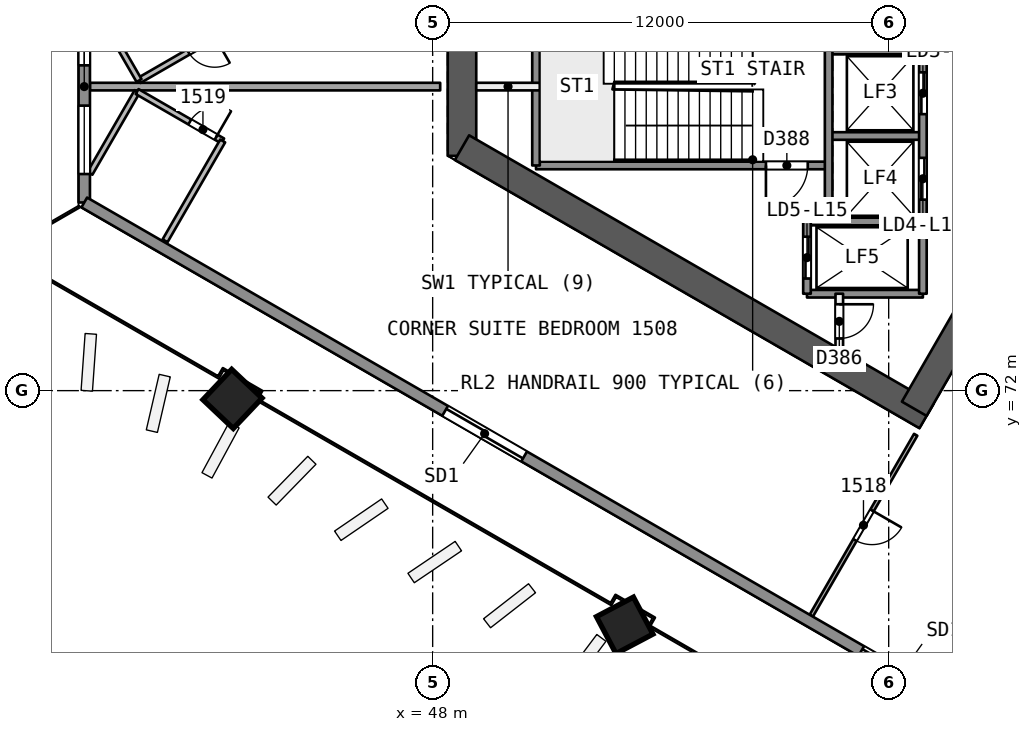
"""IFC4 building model, lengths in metres.
Left out: names, types, materials, properties, quantities, classifications, styles, units other than length and angle.
Written with IfcOpenShell. Run it as: python <this file> out.ifc"""

import sys

from ifc_helpers import new_model, si_unit, direction, frame, frame_2d, origin, origin_2d, place, context, subcontext, project, spatial, rectangle, extrude, element, fill, save


model = new_model("IFC4")
c1 = context("Model", 3, precision=1e-05, world=origin(), true_north=direction((0.0, 1.0)))
c2 = subcontext(c1, "Body", "Model", "MODEL_VIEW")
j1 = project(units=[si_unit("LENGTHUNIT", "METRE"), si_unit("PLANEANGLEUNIT", "RADIAN")], contexts=[c1])
p1 = place(None, origin())
s1 = spatial("IfcSite", under=j1, at=p1, CompositionType="ELEMENT")
p2 = place(p1, origin())
s2 = spatial("IfcBuilding", under=s1, at=p2, CompositionType="ELEMENT")
p3 = place(p2, frame((0.0, 0.0, 68.4)))
s3 = spatial("IfcBuildingStorey", under=s2, at=p3, CompositionType="ELEMENT", Elevation=68.4)
p4 = place(p3, frame((65.567, 80.0, 0.0), z_axis=(0.0, 0.0, 1.0), x_axis=(-0.499988615364, 0.866031976607, 0.0)))
e1 = element("IfcWall", 1, at=p4, inside=s3, PredefinedType="SHEAR", context=c2, shape_type="SweptSolid", body=[
    extrude(rectangle(XDim=10.163, YDim=0.75, at=frame_2d((5.082, 0.0))), origin(), (0.0, 0.0, 1.0), 3.7),
])
p5 = place(p4, frame((0.733, 0.0, 0.0)))
e2 = element("IfcOpeningElement", 2, at=p5, cuts=e1, PredefinedType="OPENING", context=c2, shape_type="SweptSolid", body=[
    extrude(rectangle(XDim=1.2, YDim=2.1, at=frame_2d((0.6, 1.05))), frame((0.0, 0.385, 0.0), z_axis=(0.0, -1.0, 0.0), x_axis=(1.0, 0.0, 0.0)), (0.0, 0.0, 1.0), 0.771),
])
p6 = place(p3, frame((48.772, 81.606, 0.0), z_axis=(0.0, 0.0, 1.0), x_axis=(0.0, -1.0, 0.0)))
e3 = element("IfcWall", 3, at=p6, inside=s3, PredefinedType="SHEAR", context=c2, shape_type="SweptSolid", body=[
    extrude(rectangle(XDim=3.429, YDim=0.75, at=frame_2d((1.714, 0.0))), origin(), (0.0, 0.0, 1.0), 3.7),
])
p7 = place(p3, frame((48.772, 78.394, 0.0), z_axis=(0.0, 0.0, 1.0), x_axis=(0.866028339916, -0.499994914436, 0.0)))
e4 = element("IfcWall", 4, at=p7, inside=s3, PredefinedType="SHEAR", context=c2, shape_type="SweptSolid", body=[
    extrude(rectangle(XDim=14.117, YDim=0.75, at=frame_2d((7.059, 0.0))), origin(), (0.0, 0.0, 1.0), 3.7),
])
p8 = place(p3, frame((60.673, 71.523, 0.0), z_axis=(0.0, 0.0, 1.0), x_axis=(0.499997052475, 0.866027105532, 0.0)))
e5 = element("IfcWall", 5, at=p8, inside=s3, PredefinedType="SHEAR", context=c2, shape_type="SweptSolid", body=[
    extrude(rectangle(XDim=10.005, YDim=0.75, at=frame_2d((5.002, 0.0))), origin(), (0.0, 0.0, 1.0), 3.7),
])
p9 = place(p8, frame((7.855, 0.0, 0.0)))
e6 = element("IfcOpeningElement", 6, at=p9, cuts=e5, PredefinedType="OPENING", context=c2, shape_type="SweptSolid", body=[
    extrude(rectangle(XDim=1.2, YDim=2.1, at=frame_2d((0.6, 1.05))), frame((0.0, 0.385, 0.0), z_axis=(0.0, -1.0, 0.0), x_axis=(1.0, 0.0, 0.0)), (0.0, 0.0, 1.0), 0.771),
])
p10 = place(p3, frame((42.698, 71.774, 0.0), z_axis=(0.028557219273, 0.006859008786, 0.999568626571), x_axis=(-0.86641042505, 0.498876758723, 0.021329673472)))
e7 = element("IfcColumn", 7, at=p10, inside=s3, PredefinedType="COLUMN", context=c2, shape_type="SweptSolid", body=[
    extrude(rectangle(XDim=1.1, YDim=1.1, at=origin_2d()), origin(), (0.0, 0.0, 1.0), 3.702),
])
p11 = place(p3, frame((53.031, 65.809, 0.0), z_axis=(0.019327242333, 0.012137244332, 0.999739538582), x_axis=(-0.865690923328, 0.500465374709, 0.010659924227)))
e8 = element("IfcColumn", 8, at=p11, inside=s3, PredefinedType="COLUMN", context=c2, shape_type="SweptSolid", body=[
    extrude(rectangle(XDim=1.1, YDim=1.1, at=origin_2d()), origin(), (0.0, 0.0, 1.0), 3.701),
])
p12 = place(p3, frame((42.525, 81.46, 0.0), z_axis=(0.0, 0.0, 1.0), x_axis=(-0.866021400173, -0.500006934395, 0.0)))
e9 = element("IfcWall", 9, at=p12, inside=s3, PredefinedType="PARTITIONING", context=c2, shape_type="SweptSolid", body=[
    extrude(rectangle(XDim=2.6, YDim=0.15, at=frame_2d((1.3, 0.0))), origin(), (0.0, 0.0, 1.0), 3.2),
])
p13 = place(p12, frame((0.3, 0.0, 0.0)))
e10 = element("IfcOpeningElement", 10, at=p13, cuts=e9, PredefinedType="OPENING", context=c2, shape_type="SweptSolid", body=[
    extrude(rectangle(XDim=0.8, YDim=2.1, at=frame_2d((0.4, 1.05))), frame((0.0, 0.085, 0.0), z_axis=(0.0, -1.0, 0.0), x_axis=(1.0, 0.0, 0.0)), (0.0, 0.0, 1.0), 0.171),
])
p14 = place(p3, frame((40.273, 80.16, 0.0), z_axis=(0.0, 0.0, 1.0), x_axis=(-0.499978610854, 0.866037752461, 0.0)))
e11 = element("IfcWall", 11, at=p14, inside=s3, PredefinedType="PARTITIONING", context=c2, shape_type="SweptSolid", body=[
    extrude(rectangle(XDim=2.585, YDim=0.15, at=frame_2d((1.292, 0.0))), origin(), (0.0, 0.0, 1.0), 3.2),
])
p15 = place(p3, frame((38.981, 80.0, 0.0), z_axis=(0.0, 0.0, 1.0), x_axis=(1.0, 0.0, 0.0)))
e12 = element("IfcWall", 12, at=p15, inside=s3, PredefinedType="PARTITIONING", context=c2, shape_type="SweptSolid", body=[
    extrude(rectangle(XDim=9.217, YDim=0.2, at=frame_2d((4.608, 0.0))), origin(), (0.0, 0.0, 1.0), 3.2),
])
p16 = place(p3, frame((60.71, 70.838, 0.0), z_axis=(0.0, 0.0, 1.0), x_axis=(-0.499974920023, -0.866039883231, 0.0)))
e13 = element("IfcWall", 13, at=p16, inside=s3, PredefinedType="PARTITIONING", context=c2, shape_type="SweptSolid", body=[
    extrude(rectangle(XDim=5.497, YDim=0.1, at=frame_2d((2.749, 0.0))), origin(), (0.0, 0.0, 1.0), 3.2),
])
p17 = place(p16, frame((2.298, 0.0, 0.0)))
e14 = element("IfcOpeningElement", 14, at=p17, cuts=e13, PredefinedType="OPENING", context=c2, shape_type="SweptSolid", body=[
    extrude(rectangle(XDim=0.9, YDim=2.1, at=frame_2d((0.45, 1.05))), frame((0.0, 0.061, 0.0), z_axis=(0.0, -1.0, 0.0), x_axis=(1.0, 0.0, 0.0)), (0.0, 0.0, 1.0), 0.121),
])
p18 = place(p3, frame((38.981, 77.718, 0.0), z_axis=(0.0, 0.0, 1.0), x_axis=(0.499986149909, 0.86603339999, 0.0)))
e15 = element("IfcWall", 15, at=p18, inside=s3, PredefinedType="PARTITIONING", context=c2, shape_type="SweptSolid", body=[
    extrude(rectangle(XDim=2.484, YDim=0.15, at=frame_2d((1.242, 0.0))), origin(), (0.0, 0.0, 1.0), 3.2),
])
p19 = place(p3, frame((40.223, 79.869, 0.0), z_axis=(0.0, 0.0, 1.0), x_axis=(0.866021400173, -0.500006934395, 0.0)))
e16 = element("IfcWall", 16, at=p19, inside=s3, PredefinedType="PARTITIONING", context=c2, shape_type="SweptSolid", body=[
    extrude(rectangle(XDim=2.6, YDim=0.15, at=frame_2d((1.3, 0.0))), origin(), (0.0, 0.0, 1.0), 3.2),
])
p20 = place(p19, frame((1.6, 0.0, 0.0)))
e17 = element("IfcOpeningElement", 17, at=p20, cuts=e16, PredefinedType="OPENING", context=c2, shape_type="SweptSolid", body=[
    extrude(rectangle(XDim=0.8, YDim=2.1, at=frame_2d((0.4, 1.05))), frame((0.0, 0.085, 0.0), z_axis=(0.0, -1.0, 0.0), x_axis=(1.0, 0.0, 0.0)), (0.0, 0.0, 1.0), 0.171),
])
p21 = place(p3, frame((42.475, 78.569, 0.0), z_axis=(0.0, 0.0, 1.0), x_axis=(-0.500077777692, -0.865980494156, 0.0)))
e18 = element("IfcWall", 18, at=p21, inside=s3, PredefinedType="PARTITIONING", context=c2, shape_type="SweptSolid", body=[
    extrude(rectangle(XDim=3.033, YDim=0.15, at=frame_2d((1.517, 0.0))), origin(), (0.0, 0.0, 1.0), 3.2),
])
p22 = place(p3, frame((38.832, 76.951, 0.0), z_axis=(0.0, 0.0, 1.0), x_axis=(0.0, 1.0, 0.0)))
e19 = element("IfcWall", 19, at=p22, inside=s3, PredefinedType="SOLIDWALL", context=c2, shape_type="SweptSolid", body=[
    extrude(rectangle(XDim=6.098, YDim=0.3, at=frame_2d((3.049, 0.0))), origin(), (0.0, 0.0, 1.0), 3.2),
])
p23 = place(p22, frame((3.608, 0.0, 0.9)))
e20 = element("IfcOpeningElement", 20, at=p23, cuts=e19, PredefinedType="OPENING", context=c2, shape_type="SweptSolid", body=[
    extrude(rectangle(XDim=1.8, YDim=1.5, at=frame_2d((0.9, 0.75))), frame((0.0, 0.161, 0.0), z_axis=(0.0, -1.0, 0.0), x_axis=(1.0, 0.0, 0.0)), (0.0, 0.0, 1.0), 0.321),
])
p24 = place(p22, frame((0.749, 0.0, 0.9)))
e21 = element("IfcOpeningElement", 21, at=p24, cuts=e19, PredefinedType="OPENING", context=c2, shape_type="SweptSolid", body=[
    extrude(rectangle(XDim=1.8, YDim=1.5, at=frame_2d((0.9, 0.75))), frame((0.0, 0.161, 0.0), z_axis=(0.0, -1.0, 0.0), x_axis=(1.0, 0.0, 0.0)), (0.0, 0.0, 1.0), 0.321),
])
p25 = place(p3, frame((90.443, 47.153, 0.0), z_axis=(0.0, 0.0, 1.0), x_axis=(-0.866024382485, 0.500001768939, 0.0)))
e22 = element("IfcWall", 22, at=p25, inside=s3, PredefinedType="SOLIDWALL", context=c2, shape_type="SweptSolid", body=[
    extrude(rectangle(XDim=59.596, YDim=0.3, at=frame_2d((29.798, 0.0))), origin(), (0.0, 0.0, 1.0), 3.2),
])
p26 = place(p25, frame((28.91, 0.0, 0.0)))
e23 = element("IfcOpeningElement", 23, at=p26, cuts=e22, PredefinedType="OPENING", context=c2, shape_type="SweptSolid", body=[
    extrude(rectangle(XDim=2.4, YDim=2.4, at=frame_2d((1.2, 1.2))), frame((0.0, 0.161, 0.0), z_axis=(0.0, -1.0, 0.0), x_axis=(1.0, 0.0, 0.0)), (0.0, 0.0, 1.0), 0.321),
])
p27 = place(p25, frame((33.586, 0.0, 0.0)))
e24 = element("IfcOpeningElement", 24, at=p27, cuts=e22, PredefinedType="OPENING", context=c2, shape_type="SweptSolid", body=[
    extrude(rectangle(XDim=2.4, YDim=2.4, at=frame_2d((1.2, 1.2))), frame((0.0, 0.161, 0.0), z_axis=(0.0, -1.0, 0.0), x_axis=(1.0, 0.0, 0.0)), (0.0, 0.0, 1.0), 0.321),
])
p28 = place(p25, frame((46.23, 0.0, 0.0)))
e25 = element("IfcOpeningElement", 25, at=p28, cuts=e22, PredefinedType="OPENING", context=c2, shape_type="SweptSolid", body=[
    extrude(rectangle(XDim=2.4, YDim=2.4, at=frame_2d((1.2, 1.2))), frame((0.0, 0.161, 0.0), z_axis=(0.0, -1.0, 0.0), x_axis=(1.0, 0.0, 0.0)), (0.0, 0.0, 1.0), 0.321),
])
p29 = place(p25, frame((12.876, 0.0, 0.0)))
e26 = element("IfcOpeningElement", 26, at=p29, cuts=e22, PredefinedType="OPENING", context=c2, shape_type="SweptSolid", body=[
    extrude(rectangle(XDim=2.4, YDim=2.4, at=frame_2d((1.2, 1.2))), frame((0.0, 0.161, 0.0), z_axis=(0.0, -1.0, 0.0), x_axis=(1.0, 0.0, 0.0)), (0.0, 0.0, 1.0), 0.321),
])
p30 = place(p3, frame((60.9, 80.95, 0.0), z_axis=(0.0, 0.0, 1.0), x_axis=(-1.0, 0.0, 0.0)))
e27 = element("IfcWall", 27, at=p30, inside=s3, PredefinedType="SOLIDWALL", context=c2, shape_type="SweptSolid", body=[
    extrude(rectangle(XDim=2.48, YDim=0.2, at=frame_2d((1.24, 0.0))), origin(), (0.0, 0.0, 1.0), 3.2),
])
p31 = place(p3, frame((50.82, 80.0, 0.0), z_axis=(0.0, 0.0, 1.0), x_axis=(-1.0, 0.0, 0.0)))
e28 = element("IfcWall", 28, at=p31, inside=s3, PredefinedType="PARTITIONING", context=c2, shape_type="SweptSolid", body=[
    extrude(rectangle(XDim=1.673, YDim=0.2, at=frame_2d((0.836, 0.0))), origin(), (0.0, 0.0, 1.0), 3.2),
])
p32 = place(p3, frame((60.9, 78.7, 0.0), z_axis=(0.0, 0.0, 1.0), x_axis=(-1.0, 0.0, 0.0)))
e29 = element("IfcWall", 29, at=p32, inside=s3, PredefinedType="SOLIDWALL", context=c2, shape_type="SweptSolid", body=[
    extrude(rectangle(XDim=2.48, YDim=0.2, at=frame_2d((1.24, 0.0))), origin(), (0.0, 0.0, 1.0), 3.2),
])
p33 = place(p3, frame((58.42, 77.925, 0.0), z_axis=(0.0, 0.0, 1.0), x_axis=(-1.0, 0.0, 0.0)))
e30 = element("IfcWall", 30, at=p33, inside=s3, PredefinedType="SOLIDWALL", context=c2, shape_type="SweptSolid", body=[
    extrude(rectangle(XDim=7.7, YDim=0.2, at=frame_2d((3.85, 0.0))), origin(), (0.0, 0.0, 1.0), 3.2),
])
p34 = place(p33, frame((0.55, 0.0, 0.0)))
e31 = element("IfcOpeningElement", 31, at=p34, cuts=e30, PredefinedType="OPENING", context=c2, shape_type="SweptSolid", body=[
    extrude(rectangle(XDim=1.1, YDim=2.1, at=frame_2d((0.55, 1.05))), frame((0.0, 0.11, 0.0), z_axis=(0.0, -1.0, 0.0), x_axis=(1.0, 0.0, 0.0)), (0.0, 0.0, 1.0), 0.221),
])
for number, where, z_axis, x_axis in (
    (32, (60.9, 76.45, 0.0), (0.0, 0.0, 1.0), (-1.0, 0.0, 0.0)),
    (33, (60.9, 74.55, 0.0), (0.0, 0.0, 1.0), (-1.0, 0.0, 0.0)),
):
    element("IfcWall", number, at=place(p3, frame(where, z_axis=z_axis, x_axis=x_axis)), inside=s3, PredefinedType="SOLIDWALL", context=c2, shape_type="SweptSolid", body=[
        extrude(rectangle(XDim=3.05, YDim=0.2, at=frame_2d((1.525, 0.0))), origin(), (0.0, 0.0, 1.0), 3.2),
    ])
p35 = place(p3, frame((60.9, 85.45, 0.0), z_axis=(0.0, 0.0, 1.0), x_axis=(0.0, -1.0, 0.0)))
e34 = element("IfcWall", 34, at=p35, inside=s3, PredefinedType="SOLIDWALL", context=c2, shape_type="SweptSolid", body=[
    extrude(rectangle(XDim=10.9, YDim=0.2, at=frame_2d((5.45, 0.0))), origin(), (0.0, 0.0, 1.0), 3.2),
])
p36 = place(p35, frame((0.575, 0.0, 0.0)))
e35 = element("IfcOpeningElement", 35, at=p36, cuts=e34, PredefinedType="OPENING", context=c2, shape_type="SweptSolid", body=[
    extrude(rectangle(XDim=1.1, YDim=2.1, at=frame_2d((0.55, 1.05))), frame((0.0, 0.11, 0.0), z_axis=(0.0, -1.0, 0.0), x_axis=(1.0, 0.0, 0.0)), (0.0, 0.0, 1.0), 0.221),
])
p37 = place(p35, frame((2.825, 0.0, 0.0)))
e36 = element("IfcOpeningElement", 36, at=p37, cuts=e34, PredefinedType="OPENING", context=c2, shape_type="SweptSolid", body=[
    extrude(rectangle(XDim=1.1, YDim=2.1, at=frame_2d((0.55, 1.05))), frame((0.0, 0.11, 0.0), z_axis=(0.0, -1.0, 0.0), x_axis=(1.0, 0.0, 0.0)), (0.0, 0.0, 1.0), 0.221),
])
p38 = place(p35, frame((5.075, 0.0, 0.0)))
e37 = element("IfcOpeningElement", 37, at=p38, cuts=e34, PredefinedType="OPENING", context=c2, shape_type="SweptSolid", body=[
    extrude(rectangle(XDim=1.1, YDim=2.1, at=frame_2d((0.55, 1.05))), frame((0.0, 0.11, 0.0), z_axis=(0.0, -1.0, 0.0), x_axis=(1.0, 0.0, 0.0)), (0.0, 0.0, 1.0), 0.221),
])
p39 = place(p35, frame((7.325, 0.0, 0.0)))
e38 = element("IfcOpeningElement", 38, at=p39, cuts=e34, PredefinedType="OPENING", context=c2, shape_type="SweptSolid", body=[
    extrude(rectangle(XDim=1.1, YDim=2.1, at=frame_2d((0.55, 1.05))), frame((0.0, 0.11, 0.0), z_axis=(0.0, -1.0, 0.0), x_axis=(1.0, 0.0, 0.0)), (0.0, 0.0, 1.0), 0.221),
])
p40 = place(p3, frame((58.7, 74.55, 0.0), z_axis=(0.0, 0.0, 1.0), x_axis=(0.0, -1.0, 0.0)))
e39 = element("IfcWall", 39, at=p40, inside=s3, PredefinedType="PARTITIONING", context=c2, shape_type="SweptSolid", body=[
    extrude(rectangle(XDim=1.455, YDim=0.2, at=frame_2d((0.728, 0.0))), origin(), (0.0, 0.0, 1.0), 3.2),
])
p41 = place(p40, frame((0.278, 0.0, 0.0)))
e40 = element("IfcOpeningElement", 40, at=p41, cuts=e39, PredefinedType="OPENING", context=c2, shape_type="SweptSolid", body=[
    extrude(rectangle(XDim=0.9, YDim=2.1, at=frame_2d((0.45, 1.05))), frame((0.0, 0.11, 0.0), z_axis=(0.0, -1.0, 0.0), x_axis=(1.0, 0.0, 0.0)), (0.0, 0.0, 1.0), 0.221),
])
p42 = place(p3, frame((58.42, 85.45, 0.0), z_axis=(0.0, 0.0, 1.0), x_axis=(0.0, -1.0, 0.0)))
e41 = element("IfcWall", 41, at=p42, inside=s3, PredefinedType="SOLIDWALL", context=c2, shape_type="SweptSolid", body=[
    extrude(rectangle(XDim=9.0, YDim=0.2, at=frame_2d((4.5, 0.0))), origin(), (0.0, 0.0, 1.0), 3.2),
])
p43 = place(p3, frame((57.85, 76.45, 0.0), z_axis=(0.0, 0.0, 1.0), x_axis=(0.0, -1.0, 0.0)))
e42 = element("IfcWall", 42, at=p43, inside=s3, PredefinedType="SOLIDWALL", context=c2, shape_type="SweptSolid", body=[
    extrude(rectangle(XDim=1.9, YDim=0.2, at=frame_2d((0.95, 0.0))), origin(), (0.0, 0.0, 1.0), 3.2),
])
p44 = place(p43, frame((0.4, 0.0, 0.0)))
e43 = element("IfcOpeningElement", 43, at=p44, cuts=e42, PredefinedType="OPENING", context=c2, shape_type="SweptSolid", body=[
    extrude(rectangle(XDim=1.1, YDim=2.1, at=frame_2d((0.55, 1.05))), frame((0.0, 0.11, 0.0), z_axis=(0.0, -1.0, 0.0), x_axis=(1.0, 0.0, 0.0)), (0.0, 0.0, 1.0), 0.221),
])
p45 = place(p3, frame((50.72, 82.075, 0.0), z_axis=(0.0, 0.0, 1.0), x_axis=(0.0, -1.0, 0.0)))
e44 = element("IfcWall", 44, at=p45, inside=s3, PredefinedType="SOLIDWALL", context=c2, shape_type="SweptSolid", body=[
    extrude(rectangle(XDim=4.15, YDim=0.2, at=frame_2d((2.075, 0.0))), origin(), (0.0, 0.0, 1.0), 3.2),
])
p46 = place(p13, origin())
e45 = element("IfcDoor", 45, at=p46, inside=s3, OperationType="SINGLE_SWING_LEFT", PredefinedType="NOTDEFINED", context=c2, shape_type="SweptSolid", body=[
    extrude(rectangle(XDim=0.8, YDim=2.1, at=frame_2d((0.4, 1.05))), frame((0.0, 0.025, 0.0), z_axis=(0.0, -1.0, 0.0), x_axis=(1.0, 0.0, 0.0)), (0.0, 0.0, 1.0), 0.05),
])
fill(e10, e45)
p47 = place(p17, origin())
e46 = element("IfcDoor", 46, at=p47, inside=s3, OperationType="SINGLE_SWING_LEFT", PredefinedType="NOTDEFINED", context=c2, shape_type="SweptSolid", body=[
    extrude(rectangle(XDim=0.9, YDim=2.1, at=frame_2d((0.45, 1.05))), frame((0.0, 0.025, 0.0), z_axis=(0.0, -1.0, 0.0), x_axis=(1.0, 0.0, 0.0)), (0.0, 0.0, 1.0), 0.05),
])
fill(e14, e46)
p48 = place(p20, origin())
e47 = element("IfcDoor", 47, at=p48, inside=s3, OperationType="SINGLE_SWING_RIGHT", PredefinedType="NOTDEFINED", context=c2, shape_type="SweptSolid", body=[
    extrude(rectangle(XDim=0.8, YDim=2.1, at=frame_2d((0.4, 1.05))), frame((0.0, 0.025, 0.0), z_axis=(0.0, -1.0, 0.0), x_axis=(1.0, 0.0, 0.0)), (0.0, 0.0, 1.0), 0.05),
])
fill(e17, e47)
p49 = place(p23, origin())
e48 = element("IfcWindow", 48, at=p49, inside=s3, PartitioningType="SINGLE_PANEL", PredefinedType="WINDOW", context=c2, shape_type="SweptSolid", body=[
    extrude(rectangle(XDim=1.8, YDim=1.5, at=frame_2d((0.9, 0.75))), frame((0.0, 0.03, 0.0), z_axis=(0.0, -1.0, 0.0), x_axis=(1.0, 0.0, 0.0)), (0.0, 0.0, 1.0), 0.06),
])
fill(e20, e48)
p50 = place(p24, origin())
e49 = element("IfcWindow", 49, at=p50, inside=s3, PartitioningType="SINGLE_PANEL", PredefinedType="WINDOW", context=c2, shape_type="SweptSolid", body=[
    extrude(rectangle(XDim=1.8, YDim=1.5, at=frame_2d((0.9, 0.75))), frame((0.0, 0.03, 0.0), z_axis=(0.0, -1.0, 0.0), x_axis=(1.0, 0.0, 0.0)), (0.0, 0.0, 1.0), 0.06),
])
fill(e21, e49)
p51 = place(p27, origin())
e50 = element("IfcDoor", 50, at=p51, inside=s3, OperationType="SLIDING_TO_RIGHT", PredefinedType="NOTDEFINED", context=c2, shape_type="SweptSolid", body=[
    extrude(rectangle(XDim=2.4, YDim=2.4, at=frame_2d((1.2, 1.2))), frame((0.0, 0.025, 0.0), z_axis=(0.0, -1.0, 0.0), x_axis=(1.0, 0.0, 0.0)), (0.0, 0.0, 1.0), 0.05),
])
fill(e24, e50)
p52 = place(p28, origin())
e51 = element("IfcDoor", 51, at=p52, inside=s3, OperationType="SLIDING_TO_LEFT", PredefinedType="NOTDEFINED", context=c2, shape_type="SweptSolid", body=[
    extrude(rectangle(XDim=2.4, YDim=2.4, at=frame_2d((1.2, 1.2))), frame((0.0, 0.025, 0.0), z_axis=(0.0, -1.0, 0.0), x_axis=(1.0, 0.0, 0.0)), (0.0, 0.0, 1.0), 0.05),
])
fill(e25, e51)
p53 = place(p38, origin())
e52 = element("IfcDoor", 52, at=p53, inside=s3, OperationType="SLIDING_TO_RIGHT", PredefinedType="NOTDEFINED", context=c2, shape_type="SweptSolid", body=[
    extrude(rectangle(XDim=1.1, YDim=2.1, at=frame_2d((0.55, 1.05))), frame((0.0, 0.025, 0.0), z_axis=(0.0, -1.0, 0.0), x_axis=(1.0, 0.0, 0.0)), (0.0, 0.0, 1.0), 0.05),
])
fill(e37, e52)
p54 = place(p39, origin())
e53 = element("IfcDoor", 53, at=p54, inside=s3, OperationType="SLIDING_TO_LEFT", PredefinedType="NOTDEFINED", context=c2, shape_type="SweptSolid", body=[
    extrude(rectangle(XDim=1.1, YDim=2.1, at=frame_2d((0.55, 1.05))), frame((0.0, 0.025, 0.0), z_axis=(0.0, -1.0, 0.0), x_axis=(1.0, 0.0, 0.0)), (0.0, 0.0, 1.0), 0.05),
])
fill(e38, e53)
p55 = place(p44, origin())
e54 = element("IfcDoor", 54, at=p55, inside=s3, OperationType="SLIDING_TO_RIGHT", PredefinedType="NOTDEFINED", context=c2, shape_type="SweptSolid", body=[
    extrude(rectangle(XDim=1.1, YDim=2.1, at=frame_2d((0.55, 1.05))), frame((0.0, 0.025, 0.0), z_axis=(0.0, -1.0, 0.0), x_axis=(1.0, 0.0, 0.0)), (0.0, 0.0, 1.0), 0.05),
])
fill(e43, e54)
p56 = place(p41, origin())
e55 = element("IfcDoor", 55, at=p56, inside=s3, OperationType="SINGLE_SWING_LEFT", PredefinedType="NOTDEFINED", context=c2, shape_type="SweptSolid", body=[
    extrude(rectangle(XDim=0.9, YDim=2.1, at=frame_2d((0.45, 1.05))), frame((0.0, 0.025, 0.0), z_axis=(0.0, -1.0, 0.0), x_axis=(1.0, 0.0, 0.0)), (0.0, 0.0, 1.0), 0.05),
])
fill(e40, e55)
p57 = place(p34, origin())
e56 = element("IfcDoor", 56, at=p57, inside=s3, OperationType="SINGLE_SWING_RIGHT", PredefinedType="NOTDEFINED", context=c2, shape_type="SweptSolid", body=[
    extrude(rectangle(XDim=1.1, YDim=2.1, at=frame_2d((0.55, 1.05))), frame((0.0, 0.025, 0.0), z_axis=(0.0, -1.0, 0.0), x_axis=(1.0, 0.0, 0.0)), (0.0, 0.0, 1.0), 0.05),
])
fill(e31, e56)
save(model, sys.argv[1])
